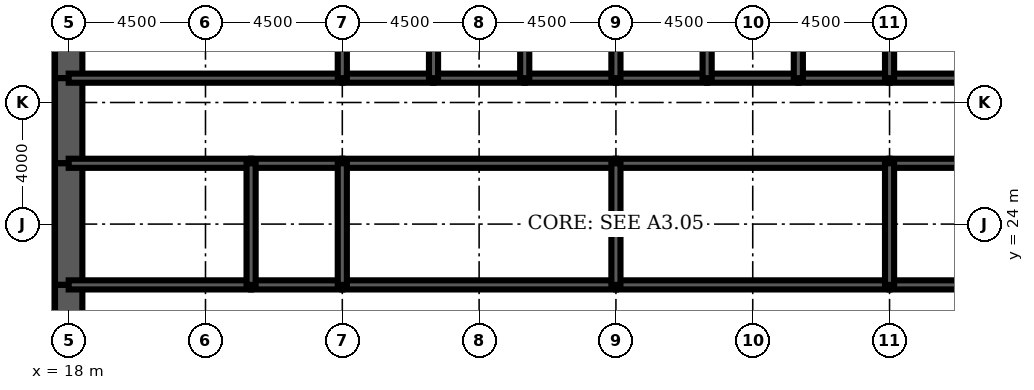
"""IFC4 building model, lengths in metres.
Left out: names, types, materials, properties, quantities, classifications, styles, units other than length and angle.
Written with IfcOpenShell. Run it as: python <this file> out.ifc"""

import sys

from ifc_helpers import new_model, si_unit, direction, frame, frame_2d, origin, place, context, subcontext, project, spatial, rectangle, extrude, element, fill, save


model = new_model("IFC4")
c1 = context("Model", 3, precision=1e-05, world=origin(), true_north=direction((0.0, 1.0)))
c2 = subcontext(c1, "Body", "Model", "MODEL_VIEW")
j1 = project(units=[si_unit("LENGTHUNIT", "METRE"), si_unit("PLANEANGLEUNIT", "RADIAN")], contexts=[c1])
p1 = place(None, origin())
s1 = spatial("IfcSite", under=j1, at=p1, CompositionType="ELEMENT")
p2 = place(p1, origin())
s2 = spatial("IfcBuilding", under=s1, at=p2, CompositionType="ELEMENT")
p3 = place(p2, frame((0.0, 0.0, 18.0)))
s3 = spatial("IfcBuildingStorey", under=s2, at=p3, CompositionType="ELEMENT", Elevation=18.0)
p4 = place(p3, frame((18.0, 32.0, 0.0), z_axis=(0.0, 0.0, 1.0), x_axis=(0.0, -1.0, 0.0)))
e1 = element("IfcWall", 1, at=p4, inside=s3, PredefinedType="SHEAR", context=c2, shape_type="SweptSolid", body=[
    extrude(rectangle(XDim=3.2, YDim=0.9, at=frame_2d((1.6, 0.0))), origin(), (0.0, 0.0, 1.0), 5.0),
])
p5 = place(p3, frame((18.0, 28.8, 0.0), z_axis=(0.0, 0.0, 1.0), x_axis=(0.0, -1.0, 0.0)))
e2 = element("IfcWall", 2, at=p5, inside=s3, PredefinedType="SHEAR", context=c2, shape_type="SweptSolid", body=[
    extrude(rectangle(XDim=2.8, YDim=0.9, at=frame_2d((1.4, 0.0))), origin(), (0.0, 0.0, 1.0), 5.0),
])
p6 = place(p5, frame((0.4, 0.0, 0.0)))
e3 = element("IfcOpeningElement", 3, at=p6, cuts=e2, PredefinedType="OPENING", context=c2, shape_type="SweptSolid", body=[
    extrude(rectangle(XDim=1.8, YDim=2.1, at=frame_2d((0.9, 1.05))), frame((0.0, 0.46, 0.0), z_axis=(0.0, -1.0, 0.0), x_axis=(1.0, 0.0, 0.0)), (0.0, 0.0, 1.0), 0.92),
])
p7 = place(p3, frame((18.0, 26.0, 0.0), z_axis=(0.0, 0.0, 1.0), x_axis=(0.0, -1.0, 0.0)))
e4 = element("IfcWall", 4, at=p7, inside=s3, PredefinedType="SHEAR", context=c2, shape_type="SweptSolid", body=[
    extrude(rectangle(XDim=4.0, YDim=0.9, at=frame_2d((2.0, 0.0))), origin(), (0.0, 0.0, 1.0), 5.0),
])
p8 = place(p3, frame((18.0, 22.0, 0.0), z_axis=(0.0, 0.0, 1.0), x_axis=(0.0, -1.0, 0.0)))
e5 = element("IfcWall", 5, at=p8, inside=s3, PredefinedType="SHEAR", context=c2, shape_type="SweptSolid", body=[
    extrude(rectangle(XDim=2.8, YDim=0.9, at=frame_2d((1.4, 0.0))), origin(), (0.0, 0.0, 1.0), 5.0),
])
p9 = place(p8, frame((0.6, 0.0, 0.0)))
e6 = element("IfcOpeningElement", 6, at=p9, cuts=e5, PredefinedType="OPENING", context=c2, shape_type="SweptSolid", body=[
    extrude(rectangle(XDim=1.8, YDim=2.1, at=frame_2d((0.9, 1.05))), frame((0.0, 0.46, 0.0), z_axis=(0.0, -1.0, 0.0), x_axis=(1.0, 0.0, 0.0)), (0.0, 0.0, 1.0), 0.92),
])
p10 = place(p3, frame((18.0, 28.8, 0.0), z_axis=(0.0, 0.0, 1.0), x_axis=(1.0, 0.0, 0.0)))
e7 = element("IfcWall", 7, at=p10, inside=s3, PredefinedType="SOLIDWALL", context=c2, shape_type="SweptSolid", body=[
    extrude(rectangle(XDim=9.0, YDim=0.3, at=frame_2d((4.5, 0.0))), origin(), (0.0, 0.0, 1.0), 5.0),
])
p11 = place(p10, frame((0.65, 0.0, 0.0)))
e8 = element("IfcOpeningElement", 8, at=p11, cuts=e7, PredefinedType="OPENING", context=c2, shape_type="SweptSolid", body=[
    extrude(rectangle(XDim=1.0, YDim=2.1, at=frame_2d((0.5, 1.05))), frame((0.0, 0.16, 0.0), z_axis=(0.0, -1.0, 0.0), x_axis=(1.0, 0.0, 0.0)), (0.0, 0.0, 1.0), 0.32),
])
p12 = place(p3, frame((27.0, 28.8, 0.0), z_axis=(0.0, 0.0, 1.0), x_axis=(1.0, 0.0, 0.0)))
e9 = element("IfcWall", 9, at=p12, inside=s3, PredefinedType="SOLIDWALL", context=c2, shape_type="SweptSolid", body=[
    extrude(rectangle(XDim=3.0, YDim=0.3, at=frame_2d((1.5, 0.0))), origin(), (0.0, 0.0, 1.0), 5.0),
])
p13 = place(p12, frame((0.95, 0.0, 0.0)))
e10 = element("IfcOpeningElement", 10, at=p13, cuts=e9, PredefinedType="OPENING", context=c2, shape_type="SweptSolid", body=[
    extrude(rectangle(XDim=1.1, YDim=2.2, at=frame_2d((0.55, 1.1))), frame((0.0, 0.16, 0.0), z_axis=(0.0, -1.0, 0.0), x_axis=(1.0, 0.0, 0.0)), (0.0, 0.0, 1.0), 0.32),
])
p14 = place(p3, frame((30.0, 28.8, 0.0), z_axis=(0.0, 0.0, 1.0), x_axis=(1.0, 0.0, 0.0)))
e11 = element("IfcWall", 11, at=p14, inside=s3, PredefinedType="SOLIDWALL", context=c2, shape_type="SweptSolid", body=[
    extrude(rectangle(XDim=3.0, YDim=0.3, at=frame_2d((1.5, 0.0))), origin(), (0.0, 0.0, 1.0), 5.0),
])
p15 = place(p14, frame((0.95, 0.0, 0.0)))
e12 = element("IfcOpeningElement", 12, at=p15, cuts=e11, PredefinedType="OPENING", context=c2, shape_type="SweptSolid", body=[
    extrude(rectangle(XDim=1.1, YDim=2.2, at=frame_2d((0.55, 1.1))), frame((0.0, 0.16, 0.0), z_axis=(0.0, -1.0, 0.0), x_axis=(1.0, 0.0, 0.0)), (0.0, 0.0, 1.0), 0.32),
])
p16 = place(p3, frame((33.0, 28.8, 0.0), z_axis=(0.0, 0.0, 1.0), x_axis=(1.0, 0.0, 0.0)))
e13 = element("IfcWall", 13, at=p16, inside=s3, PredefinedType="SOLIDWALL", context=c2, shape_type="SweptSolid", body=[
    extrude(rectangle(XDim=3.0, YDim=0.3, at=frame_2d((1.5, 0.0))), origin(), (0.0, 0.0, 1.0), 5.0),
])
p17 = place(p16, frame((0.95, 0.0, 0.0)))
e14 = element("IfcOpeningElement", 14, at=p17, cuts=e13, PredefinedType="OPENING", context=c2, shape_type="SweptSolid", body=[
    extrude(rectangle(XDim=1.1, YDim=2.2, at=frame_2d((0.55, 1.1))), frame((0.0, 0.16, 0.0), z_axis=(0.0, -1.0, 0.0), x_axis=(1.0, 0.0, 0.0)), (0.0, 0.0, 1.0), 0.32),
])
for number, where, z_axis, x_axis in (
    (15, (36.0, 28.8, 0.0), (0.0, 0.0, 1.0), (1.0, 0.0, 0.0)),
    (16, (39.0, 28.8, 0.0), (0.0, 0.0, 1.0), (1.0, 0.0, 0.0)),
):
    element("IfcWall", number, at=place(p3, frame(where, z_axis=z_axis, x_axis=x_axis)), inside=s3, PredefinedType="SOLIDWALL", context=c2, shape_type="SweptSolid", body=[
        extrude(rectangle(XDim=3.0, YDim=0.3, at=frame_2d((1.5, 0.0))), origin(), (0.0, 0.0, 1.0), 5.0),
    ])
p18 = place(p3, frame((42.0, 28.8, 0.0), z_axis=(0.0, 0.0, 1.0), x_axis=(1.0, 0.0, 0.0)))
e17 = element("IfcWall", 17, at=p18, inside=s3, PredefinedType="SOLIDWALL", context=c2, shape_type="SweptSolid", body=[
    extrude(rectangle(XDim=3.0, YDim=0.3, at=frame_2d((1.5, 0.0))), origin(), (0.0, 0.0, 1.0), 5.0),
])
p19 = place(p18, frame((0.95, 0.0, 0.0)))
e18 = element("IfcOpeningElement", 18, at=p19, cuts=e17, PredefinedType="OPENING", context=c2, shape_type="SweptSolid", body=[
    extrude(rectangle(XDim=1.1, YDim=2.2, at=frame_2d((0.55, 1.1))), frame((0.0, 0.16, 0.0), z_axis=(0.0, -1.0, 0.0), x_axis=(1.0, 0.0, 0.0)), (0.0, 0.0, 1.0), 0.32),
])
p20 = place(p3, frame((45.0, 28.8, 0.0), z_axis=(0.0, 0.0, 1.0), x_axis=(1.0, 0.0, 0.0)))
e19 = element("IfcWall", 19, at=p20, inside=s3, PredefinedType="SOLIDWALL", context=c2, shape_type="SweptSolid", body=[
    extrude(rectangle(XDim=9.0, YDim=0.3, at=frame_2d((4.5, 0.0))), origin(), (0.0, 0.0, 1.0), 5.0),
])
p21 = place(p20, frame((7.35, 0.0, 0.0)))
e20 = element("IfcOpeningElement", 20, at=p21, cuts=e19, PredefinedType="OPENING", context=c2, shape_type="SweptSolid", body=[
    extrude(rectangle(XDim=1.0, YDim=2.1, at=frame_2d((0.5, 1.05))), frame((0.0, 0.16, 0.0), z_axis=(0.0, -1.0, 0.0), x_axis=(1.0, 0.0, 0.0)), (0.0, 0.0, 1.0), 0.32),
])
p22 = place(p3, frame((18.0, 22.0, 0.0), z_axis=(0.0, 0.0, 1.0), x_axis=(1.0, 0.0, 0.0)))
e21 = element("IfcWall", 21, at=p22, inside=s3, PredefinedType="SOLIDWALL", context=c2, shape_type="SweptSolid", body=[
    extrude(rectangle(XDim=6.0, YDim=0.3, at=frame_2d((3.0, 0.0))), origin(), (0.0, 0.0, 1.0), 5.0),
])
p23 = place(p22, frame((4.4, 0.0, 0.0)))
e22 = element("IfcOpeningElement", 22, at=p23, cuts=e21, PredefinedType="OPENING", context=c2, shape_type="SweptSolid", body=[
    extrude(rectangle(XDim=1.0, YDim=2.1, at=frame_2d((0.5, 1.05))), frame((0.0, 0.16, 0.0), z_axis=(0.0, -1.0, 0.0), x_axis=(1.0, 0.0, 0.0)), (0.0, 0.0, 1.0), 0.32),
])
p24 = place(p22, frame((1.0, 0.0, 0.0)))
e23 = element("IfcOpeningElement", 23, at=p24, cuts=e21, PredefinedType="OPENING", context=c2, shape_type="SweptSolid", body=[
    extrude(rectangle(XDim=1.0, YDim=2.1, at=frame_2d((0.5, 1.05))), frame((0.0, 0.16, 0.0), z_axis=(0.0, -1.0, 0.0), x_axis=(1.0, 0.0, 0.0)), (0.0, 0.0, 1.0), 0.32),
])
p25 = place(p3, frame((24.0, 22.0, 0.0), z_axis=(0.0, 0.0, 1.0), x_axis=(1.0, 0.0, 0.0)))
e24 = element("IfcWall", 24, at=p25, inside=s3, PredefinedType="SOLIDWALL", context=c2, shape_type="SweptSolid", body=[
    extrude(rectangle(XDim=3.0, YDim=0.3, at=frame_2d((1.5, 0.0))), origin(), (0.0, 0.0, 1.0), 5.0),
])
p26 = place(p25, frame((1.0, 0.0, 0.0)))
e25 = element("IfcOpeningElement", 25, at=p26, cuts=e24, PredefinedType="OPENING", context=c2, shape_type="SweptSolid", body=[
    extrude(rectangle(XDim=1.0, YDim=2.1, at=frame_2d((0.5, 1.05))), frame((0.0, 0.16, 0.0), z_axis=(0.0, -1.0, 0.0), x_axis=(1.0, 0.0, 0.0)), (0.0, 0.0, 1.0), 0.32),
])
p27 = place(p3, frame((27.0, 22.0, 0.0), z_axis=(0.0, 0.0, 1.0), x_axis=(1.0, 0.0, 0.0)))
e26 = element("IfcWall", 26, at=p27, inside=s3, PredefinedType="SOLIDWALL", context=c2, shape_type="SweptSolid", body=[
    extrude(rectangle(XDim=9.0, YDim=0.3, at=frame_2d((4.5, 0.0))), origin(), (0.0, 0.0, 1.0), 5.0),
])
p28 = place(p27, frame((4.0, 0.0, 0.0)))
e27 = element("IfcOpeningElement", 27, at=p28, cuts=e26, PredefinedType="OPENING", context=c2, shape_type="SweptSolid", body=[
    extrude(rectangle(XDim=1.0, YDim=2.1, at=frame_2d((0.5, 1.05))), frame((0.0, 0.16, 0.0), z_axis=(0.0, -1.0, 0.0), x_axis=(1.0, 0.0, 0.0)), (0.0, 0.0, 1.0), 0.32),
])
p29 = place(p3, frame((36.0, 22.0, 0.0), z_axis=(0.0, 0.0, 1.0), x_axis=(1.0, 0.0, 0.0)))
e28 = element("IfcWall", 28, at=p29, inside=s3, PredefinedType="SOLIDWALL", context=c2, shape_type="SweptSolid", body=[
    extrude(rectangle(XDim=9.0, YDim=0.3, at=frame_2d((4.5, 0.0))), origin(), (0.0, 0.0, 1.0), 5.0),
])
p30 = place(p29, frame((4.0, 0.0, 0.0)))
e29 = element("IfcOpeningElement", 29, at=p30, cuts=e28, PredefinedType="OPENING", context=c2, shape_type="SweptSolid", body=[
    extrude(rectangle(XDim=1.0, YDim=2.1, at=frame_2d((0.5, 1.05))), frame((0.0, 0.16, 0.0), z_axis=(0.0, -1.0, 0.0), x_axis=(1.0, 0.0, 0.0)), (0.0, 0.0, 1.0), 0.32),
])
p31 = place(p3, frame((45.0, 22.0, 0.0), z_axis=(0.0, 0.0, 1.0), x_axis=(1.0, 0.0, 0.0)))
e30 = element("IfcWall", 30, at=p31, inside=s3, PredefinedType="SOLIDWALL", context=c2, shape_type="SweptSolid", body=[
    extrude(rectangle(XDim=3.0, YDim=0.3, at=frame_2d((1.5, 0.0))), origin(), (0.0, 0.0, 1.0), 5.0),
])
p32 = place(p31, frame((1.0, 0.0, 0.0)))
e31 = element("IfcOpeningElement", 31, at=p32, cuts=e30, PredefinedType="OPENING", context=c2, shape_type="SweptSolid", body=[
    extrude(rectangle(XDim=1.0, YDim=2.1, at=frame_2d((0.5, 1.05))), frame((0.0, 0.16, 0.0), z_axis=(0.0, -1.0, 0.0), x_axis=(1.0, 0.0, 0.0)), (0.0, 0.0, 1.0), 0.32),
])
p33 = place(p3, frame((18.0, 26.0, 0.0), z_axis=(0.0, 0.0, 1.0), x_axis=(1.0, 0.0, 0.0)))
e32 = element("IfcWall", 32, at=p33, inside=s3, PredefinedType="SOLIDWALL", context=c2, shape_type="SweptSolid", body=[
    extrude(rectangle(XDim=6.0, YDim=0.3, at=frame_2d((3.0, 0.0))), origin(), (0.0, 0.0, 1.0), 5.0),
])
p34 = place(p3, frame((24.0, 26.0, 0.0), z_axis=(0.0, 0.0, 1.0), x_axis=(1.0, 0.0, 0.0)))
e33 = element("IfcWall", 33, at=p34, inside=s3, PredefinedType="SOLIDWALL", context=c2, shape_type="SweptSolid", body=[
    extrude(rectangle(XDim=3.0, YDim=0.3, at=frame_2d((1.5, 0.0))), origin(), (0.0, 0.0, 1.0), 5.0),
])
for number, where, z_axis, x_axis in (
    (34, (27.0, 26.0, 0.0), (0.0, 0.0, 1.0), (1.0, 0.0, 0.0)),
    (35, (36.0, 26.0, 0.0), (0.0, 0.0, 1.0), (1.0, 0.0, 0.0)),
):
    element("IfcWall", number, at=place(p3, frame(where, z_axis=z_axis, x_axis=x_axis)), inside=s3, PredefinedType="SOLIDWALL", context=c2, shape_type="SweptSolid", body=[
        extrude(rectangle(XDim=9.0, YDim=0.3, at=frame_2d((4.5, 0.0))), origin(), (0.0, 0.0, 1.0), 5.0),
    ])
p35 = place(p3, frame((45.0, 26.0, 0.0), z_axis=(0.0, 0.0, 1.0), x_axis=(1.0, 0.0, 0.0)))
e36 = element("IfcWall", 36, at=p35, inside=s3, PredefinedType="SOLIDWALL", context=c2, shape_type="SweptSolid", body=[
    extrude(rectangle(XDim=3.0, YDim=0.3, at=frame_2d((1.5, 0.0))), origin(), (0.0, 0.0, 1.0), 5.0),
])
for number, where, z_axis, x_axis in (
    (37, (27.0, 28.8, 0.0), (0.0, 0.0, 1.0), (0.0, 1.0, 0.0)),
    (38, (30.0, 28.8, 0.0), (0.0, 0.0, 1.0), (0.0, 1.0, 0.0)),
    (39, (33.0, 28.8, 0.0), (0.0, 0.0, 1.0), (0.0, 1.0, 0.0)),
    (40, (36.0, 28.8, 0.0), (0.0, 0.0, 1.0), (0.0, 1.0, 0.0)),
    (41, (39.0, 28.8, 0.0), (0.0, 0.0, 1.0), (0.0, 1.0, 0.0)),
    (42, (42.0, 28.8, 0.0), (0.0, 0.0, 1.0), (0.0, 1.0, 0.0)),
    (43, (45.0, 28.8, 0.0), (0.0, 0.0, 1.0), (0.0, 1.0, 0.0)),
):
    element("IfcWall", number, at=place(p3, frame(where, z_axis=z_axis, x_axis=x_axis)), inside=s3, PredefinedType="SOLIDWALL", context=c2, shape_type="SweptSolid", body=[
        extrude(rectangle(XDim=3.2, YDim=0.3, at=frame_2d((1.6, 0.0))), origin(), (0.0, 0.0, 1.0), 5.0),
    ])
for number, where, z_axis, x_axis in (
    (44, (24.0, 22.0, 0.0), (0.0, 0.0, 1.0), (0.0, 1.0, 0.0)),
    (45, (27.0, 22.0, 0.0), (0.0, 0.0, 1.0), (0.0, 1.0, 0.0)),
    (46, (36.0, 22.0, 0.0), (0.0, 0.0, 1.0), (0.0, 1.0, 0.0)),
    (47, (45.0, 22.0, 0.0), (0.0, 0.0, 1.0), (0.0, 1.0, 0.0)),
):
    element("IfcWall", number, at=place(p3, frame(where, z_axis=z_axis, x_axis=x_axis)), inside=s3, PredefinedType="SOLIDWALL", context=c2, shape_type="SweptSolid", body=[
        extrude(rectangle(XDim=4.0, YDim=0.3, at=frame_2d((2.0, 0.0))), origin(), (0.0, 0.0, 1.0), 5.0),
    ])
p36 = place(p3, frame((42.5, 22.15, 0.0), z_axis=(0.0, 0.0, 1.0), x_axis=(0.0, 1.0, 0.0)))
e48 = element("IfcWall", 48, at=p36, inside=s3, PredefinedType="PARTITIONING", context=c2, shape_type="SweptSolid", body=[
    extrude(rectangle(XDim=3.7, YDim=0.15, at=frame_2d((1.85, 0.0))), origin(), (0.0, 0.0, 1.0), 3.0),
])
p37 = place(p36, frame((2.2, 0.0, 0.0)))
e49 = element("IfcOpeningElement", 49, at=p37, cuts=e48, PredefinedType="OPENING", context=c2, shape_type="SweptSolid", body=[
    extrude(rectangle(XDim=1.0, YDim=2.1, at=frame_2d((0.5, 1.05))), frame((0.0, 0.085, 0.0), z_axis=(0.0, -1.0, 0.0), x_axis=(1.0, 0.0, 0.0)), (0.0, 0.0, 1.0), 0.17),
])
p38 = place(p3, frame((20.625, 22.15, 0.0), z_axis=(0.0, 0.0, 1.0), x_axis=(0.0, 1.0, 0.0)))
e50 = element("IfcWall", 50, at=p38, inside=s3, PredefinedType="PARTITIONING", context=c2, shape_type="SweptSolid", body=[
    extrude(rectangle(XDim=3.7, YDim=0.15, at=frame_2d((1.85, 0.0))), origin(), (0.0, 0.0, 1.0), 3.0),
])
p39 = place(p3, frame((46.2, 26.15, 0.0), z_axis=(0.0, 0.0, 1.0), x_axis=(0.0, 1.0, 0.0)))
e51 = element("IfcWall", 51, at=p39, inside=s3, PredefinedType="PARTITIONING", context=c2, shape_type="SweptSolid", body=[
    extrude(rectangle(XDim=2.5, YDim=0.15, at=frame_2d((1.25, 0.0))), origin(), (0.0, 0.0, 1.0), 3.0),
])
p40 = place(p39, frame((1.15, 0.0, 0.0)))
e52 = element("IfcOpeningElement", 52, at=p40, cuts=e51, PredefinedType="OPENING", context=c2, shape_type="SweptSolid", body=[
    extrude(rectangle(XDim=1.0, YDim=2.1, at=frame_2d((0.5, 1.05))), frame((0.0, 0.085, 0.0), z_axis=(0.0, -1.0, 0.0), x_axis=(1.0, 0.0, 0.0)), (0.0, 0.0, 1.0), 0.17),
])
p41 = place(p3, frame((24.5, 19.35, 0.0), z_axis=(0.0, 0.0, 1.0), x_axis=(0.0, 1.0, 0.0)))
e53 = element("IfcWall", 53, at=p41, inside=s3, PredefinedType="PARTITIONING", context=c2, shape_type="SweptSolid", body=[
    extrude(rectangle(XDim=2.5, YDim=0.15, at=frame_2d((1.25, 0.0))), origin(), (0.0, 0.0, 1.0), 3.0),
])
p42 = place(p41, frame((1.15, 0.0, 0.0)))
e54 = element("IfcOpeningElement", 54, at=p42, cuts=e53, PredefinedType="OPENING", context=c2, shape_type="SweptSolid", body=[
    extrude(rectangle(XDim=1.0, YDim=2.1, at=frame_2d((0.5, 1.05))), frame((0.0, 0.085, 0.0), z_axis=(0.0, -1.0, 0.0), x_axis=(1.0, 0.0, 0.0)), (0.0, 0.0, 1.0), 0.17),
])
p43 = place(p37, origin())
e55 = element("IfcDoor", 55, at=p43, inside=s3, OperationType="SINGLE_SWING_RIGHT", PredefinedType="DOOR", context=c2, shape_type="SweptSolid", body=[
    extrude(rectangle(XDim=1.0, YDim=2.1, at=frame_2d((0.5, 1.05))), frame((0.0, 0.025, 0.0), z_axis=(0.0, -1.0, 0.0), x_axis=(1.0, 0.0, 0.0)), (0.0, 0.0, 1.0), 0.05),
])
fill(e49, e55)
p44 = place(p40, origin())
e56 = element("IfcDoor", 56, at=p44, inside=s3, OperationType="SINGLE_SWING_RIGHT", PredefinedType="DOOR", context=c2, shape_type="SweptSolid", body=[
    extrude(rectangle(XDim=1.0, YDim=2.1, at=frame_2d((0.5, 1.05))), frame((0.0, 0.025, 0.0), z_axis=(0.0, -1.0, 0.0), x_axis=(1.0, 0.0, 0.0)), (0.0, 0.0, 1.0), 0.05),
])
fill(e52, e56)
p45 = place(p42, origin())
e57 = element("IfcDoor", 57, at=p45, inside=s3, OperationType="SINGLE_SWING_RIGHT", PredefinedType="DOOR", context=c2, shape_type="SweptSolid", body=[
    extrude(rectangle(XDim=1.0, YDim=2.1, at=frame_2d((0.5, 1.05))), frame((0.0, 0.025, 0.0), z_axis=(0.0, -1.0, 0.0), x_axis=(1.0, 0.0, 0.0)), (0.0, 0.0, 1.0), 0.05),
])
fill(e54, e57)
p46 = place(p19, origin())
e58 = element("IfcDoor", 58, at=p46, inside=s3, OperationType="DOUBLE_DOOR_SLIDING", PredefinedType="USERDEFINED", context=c2, shape_type="SweptSolid", body=[
    extrude(rectangle(XDim=1.1, YDim=2.2, at=frame_2d((0.55, 1.1))), frame((0.0, 0.025, 0.0), z_axis=(0.0, -1.0, 0.0), x_axis=(1.0, 0.0, 0.0)), (0.0, 0.0, 1.0), 0.05),
])
fill(e18, e58)
p47 = place(p13, origin())
e59 = element("IfcDoor", 59, at=p47, inside=s3, OperationType="DOUBLE_DOOR_SLIDING", PredefinedType="USERDEFINED", context=c2, shape_type="SweptSolid", body=[
    extrude(rectangle(XDim=1.1, YDim=2.2, at=frame_2d((0.55, 1.1))), frame((0.0, 0.025, 0.0), z_axis=(0.0, -1.0, 0.0), x_axis=(1.0, 0.0, 0.0)), (0.0, 0.0, 1.0), 0.05),
])
fill(e10, e59)
p48 = place(p15, origin())
e60 = element("IfcDoor", 60, at=p48, inside=s3, OperationType="DOUBLE_DOOR_SLIDING", PredefinedType="USERDEFINED", context=c2, shape_type="SweptSolid", body=[
    extrude(rectangle(XDim=1.1, YDim=2.2, at=frame_2d((0.55, 1.1))), frame((0.0, 0.025, 0.0), z_axis=(0.0, -1.0, 0.0), x_axis=(1.0, 0.0, 0.0)), (0.0, 0.0, 1.0), 0.05),
])
fill(e12, e60)
p49 = place(p17, origin())
e61 = element("IfcDoor", 61, at=p49, inside=s3, OperationType="DOUBLE_DOOR_SLIDING", PredefinedType="USERDEFINED", context=c2, shape_type="SweptSolid", body=[
    extrude(rectangle(XDim=1.1, YDim=2.2, at=frame_2d((0.55, 1.1))), frame((0.0, 0.025, 0.0), z_axis=(0.0, -1.0, 0.0), x_axis=(1.0, 0.0, 0.0)), (0.0, 0.0, 1.0), 0.05),
])
fill(e14, e61)
p50 = place(p11, origin())
e62 = element("IfcDoor", 62, at=p50, inside=s3, OperationType="SINGLE_SWING_LEFT", PredefinedType="DOOR", context=c2, shape_type="SweptSolid", body=[
    extrude(rectangle(XDim=1.0, YDim=2.1, at=frame_2d((0.5, 1.05))), frame((0.0, 0.025, 0.0), z_axis=(0.0, -1.0, 0.0), x_axis=(1.0, 0.0, 0.0)), (0.0, 0.0, 1.0), 0.05),
])
fill(e8, e62)
p51 = place(p9, origin())
e63 = element("IfcDoor", 63, at=p51, inside=s3, OperationType="SINGLE_SWING_LEFT", PredefinedType="DOOR", context=c2, shape_type="SweptSolid", body=[
    extrude(rectangle(XDim=1.8, YDim=2.1, at=frame_2d((0.9, 1.05))), frame((0.0, 0.45, 0.0), z_axis=(0.0, -1.0, 0.0), x_axis=(1.0, 0.0, 0.0)), (0.0, 0.0, 1.0), 0.899),
])
fill(e6, e63)
p52 = place(p6, origin())
e64 = element("IfcDoor", 64, at=p52, inside=s3, OperationType="SINGLE_SWING_LEFT", PredefinedType="DOOR", context=c2, shape_type="SweptSolid", body=[
    extrude(rectangle(XDim=1.8, YDim=2.1, at=frame_2d((0.9, 1.05))), frame((0.0, 0.45, 0.0), z_axis=(0.0, -1.0, 0.0), x_axis=(1.0, 0.0, 0.0)), (0.0, 0.0, 1.0), 0.899),
])
fill(e3, e64)
p53 = place(p23, origin())
e65 = element("IfcDoor", 65, at=p53, inside=s3, OperationType="SINGLE_SWING_RIGHT", PredefinedType="DOOR", context=c2, shape_type="SweptSolid", body=[
    extrude(rectangle(XDim=1.0, YDim=2.1, at=frame_2d((0.5, 1.05))), frame((0.0, 0.025, 0.0), z_axis=(0.0, -1.0, 0.0), x_axis=(1.0, 0.0, 0.0)), (0.0, 0.0, 1.0), 0.05),
])
fill(e22, e65)
p54 = place(p26, origin())
e66 = element("IfcDoor", 66, at=p54, inside=s3, OperationType="SINGLE_SWING_LEFT", PredefinedType="DOOR", context=c2, shape_type="SweptSolid", body=[
    extrude(rectangle(XDim=1.0, YDim=2.1, at=frame_2d((0.5, 1.05))), frame((0.0, 0.025, 0.0), z_axis=(0.0, -1.0, 0.0), x_axis=(1.0, 0.0, 0.0)), (0.0, 0.0, 1.0), 0.05),
])
fill(e25, e66)
p55 = place(p28, origin())
e67 = element("IfcDoor", 67, at=p55, inside=s3, OperationType="SINGLE_SWING_LEFT", PredefinedType="DOOR", context=c2, shape_type="SweptSolid", body=[
    extrude(rectangle(XDim=1.0, YDim=2.1, at=frame_2d((0.5, 1.05))), frame((0.0, 0.025, 0.0), z_axis=(0.0, -1.0, 0.0), x_axis=(1.0, 0.0, 0.0)), (0.0, 0.0, 1.0), 0.05),
])
fill(e27, e67)
p56 = place(p30, origin())
e68 = element("IfcDoor", 68, at=p56, inside=s3, OperationType="SINGLE_SWING_LEFT", PredefinedType="DOOR", context=c2, shape_type="SweptSolid", body=[
    extrude(rectangle(XDim=1.0, YDim=2.1, at=frame_2d((0.5, 1.05))), frame((0.0, 0.025, 0.0), z_axis=(0.0, -1.0, 0.0), x_axis=(1.0, 0.0, 0.0)), (0.0, 0.0, 1.0), 0.05),
])
fill(e29, e68)
p57 = place(p32, origin())
e69 = element("IfcDoor", 69, at=p57, inside=s3, OperationType="SINGLE_SWING_LEFT", PredefinedType="DOOR", context=c2, shape_type="SweptSolid", body=[
    extrude(rectangle(XDim=1.0, YDim=2.1, at=frame_2d((0.5, 1.05))), frame((0.0, 0.025, 0.0), z_axis=(0.0, -1.0, 0.0), x_axis=(1.0, 0.0, 0.0)), (0.0, 0.0, 1.0), 0.05),
])
fill(e31, e69)
p58 = place(p24, origin())
e70 = element("IfcDoor", 70, at=p58, inside=s3, OperationType="SINGLE_SWING_LEFT", PredefinedType="DOOR", context=c2, shape_type="SweptSolid", body=[
    extrude(rectangle(XDim=1.0, YDim=2.1, at=frame_2d((0.5, 1.05))), frame((0.0, 0.025, 0.0), z_axis=(0.0, -1.0, 0.0), x_axis=(1.0, 0.0, 0.0)), (0.0, 0.0, 1.0), 0.05),
])
fill(e23, e70)
save(model, sys.argv[1])
